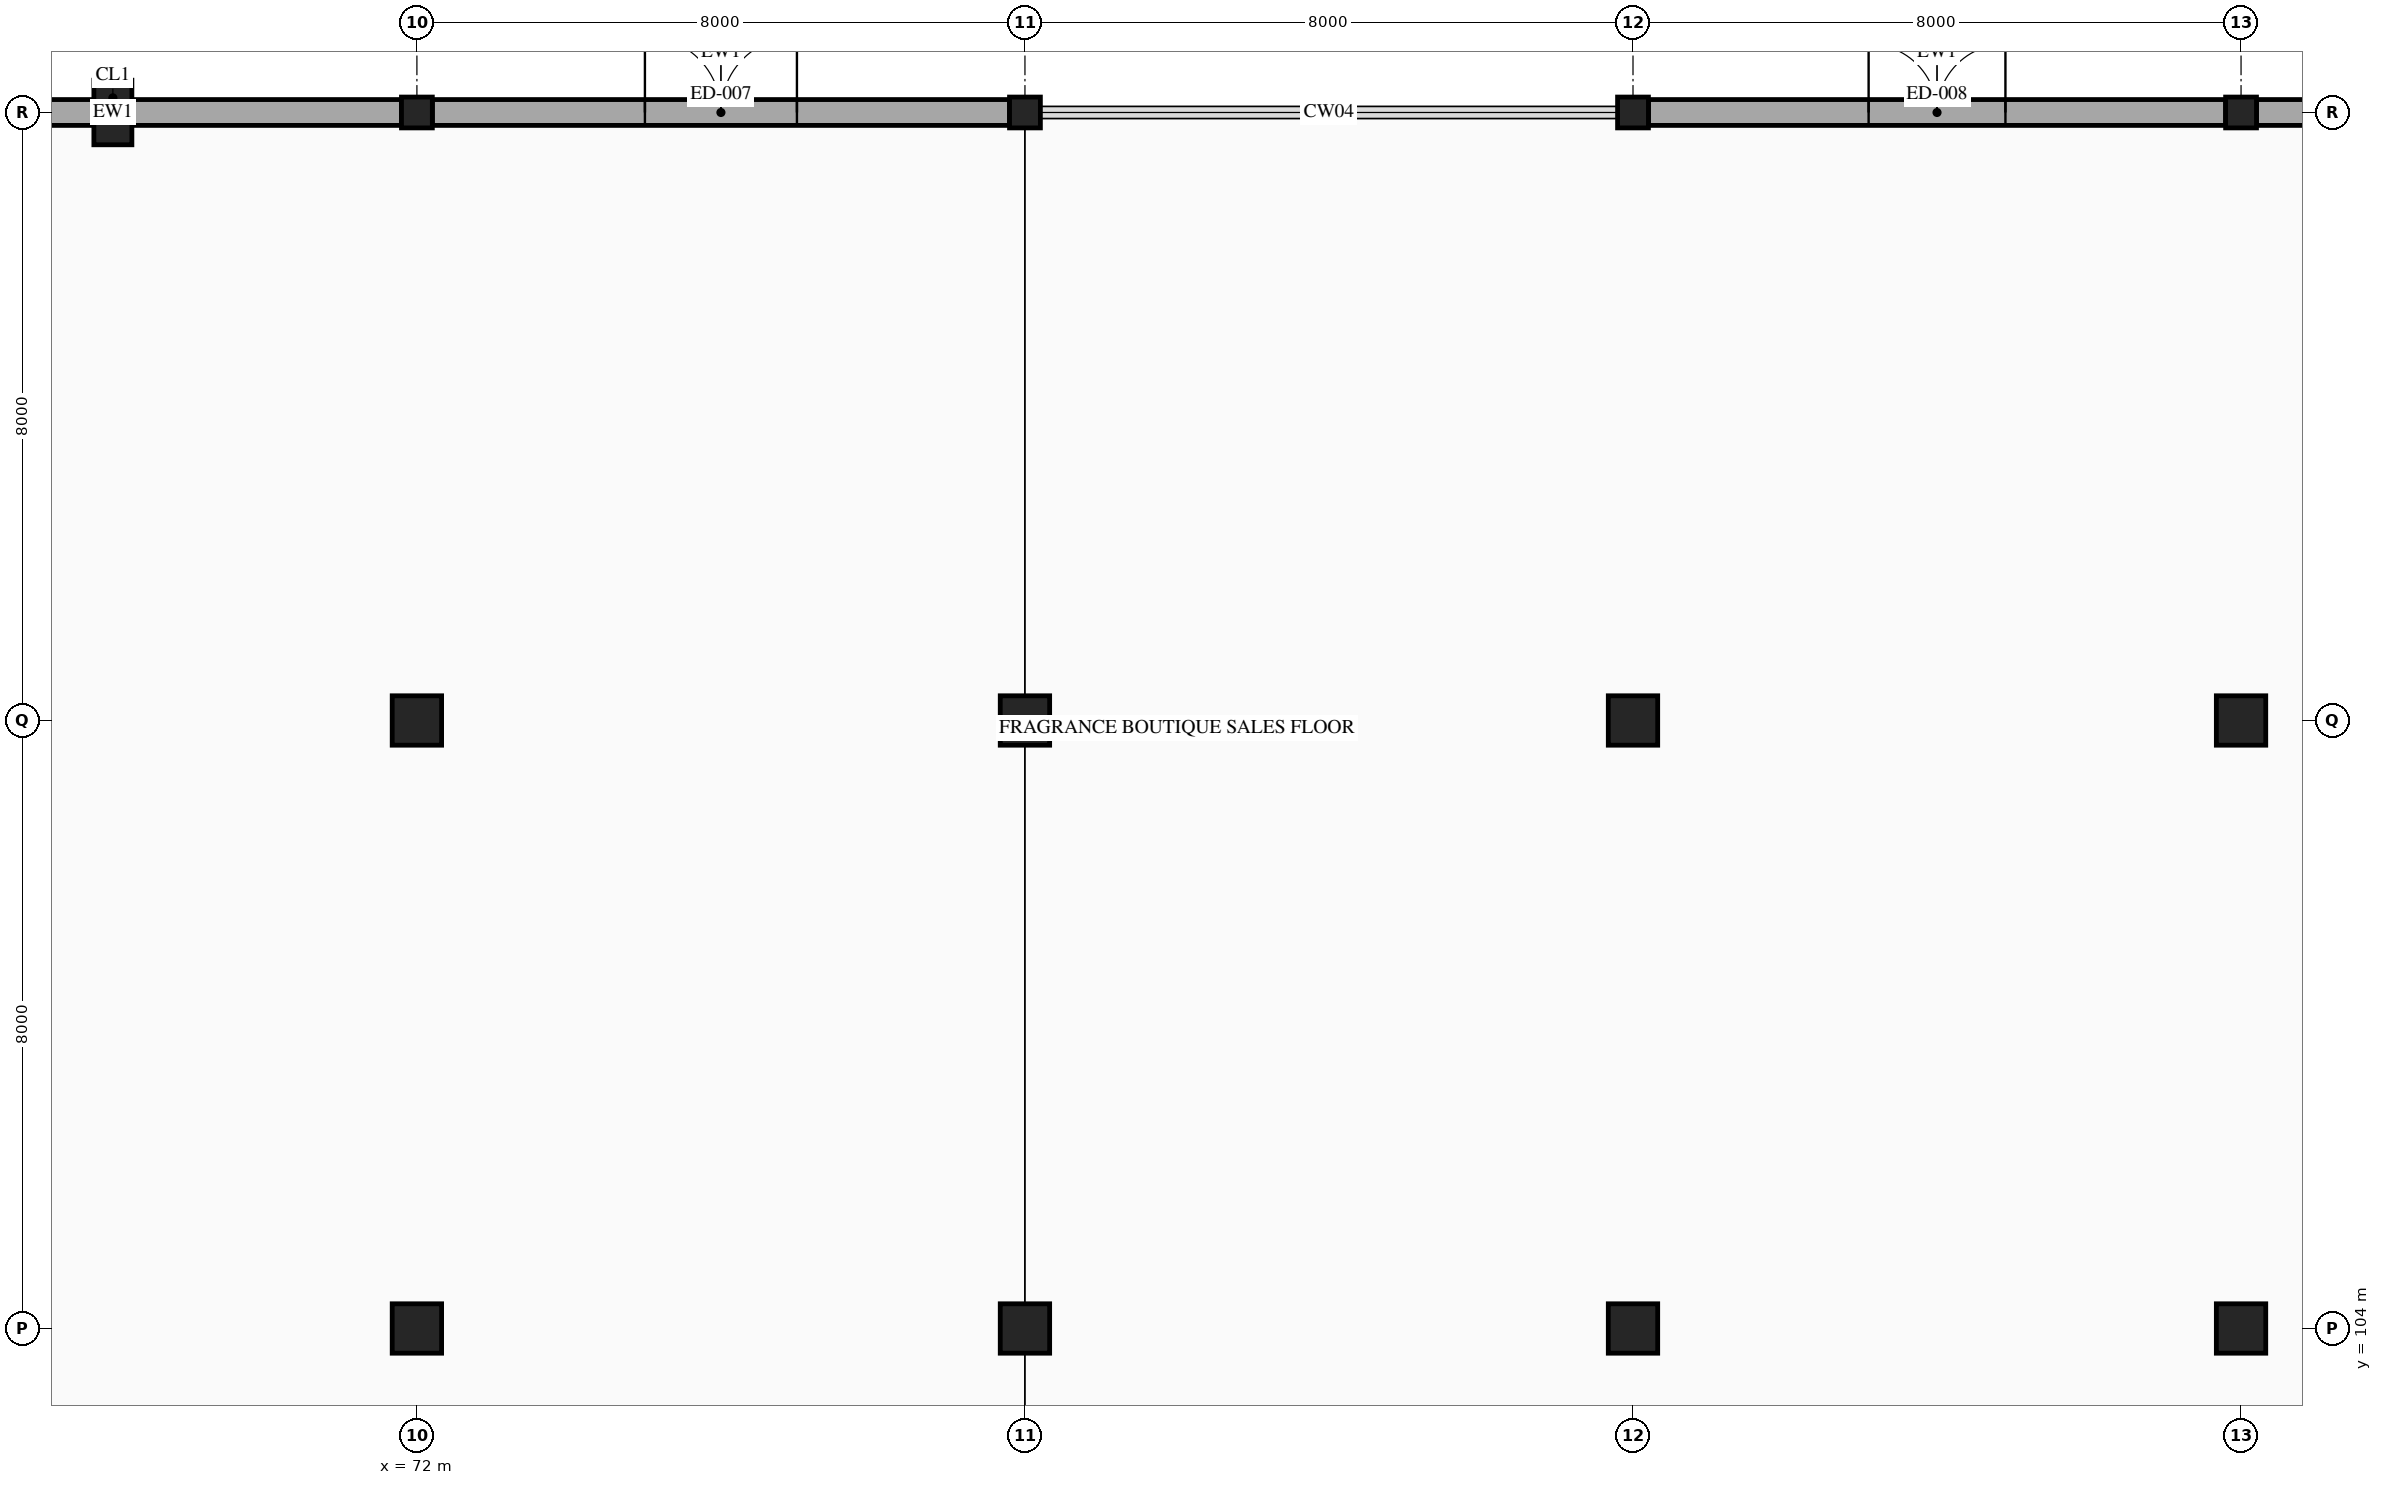
"""IFC4 building model, lengths in metres.
Left out: names, types, materials, properties, quantities, classifications, styles, units other than length and angle.
Written with IfcOpenShell. Run it as: python <this file> out.ifc"""

import sys

from ifc_helpers import new_model, si_unit, direction, frame, frame_2d, origin, origin_2d, place, context, subcontext, project, spatial, rectangle, hollow_rectangle, extrude, element, fill, save


model = new_model("IFC4")
c1 = context("Model", 3, precision=1e-05, world=origin(), true_north=direction((0.0, 1.0)))
c2 = subcontext(c1, "Body", "Model", "MODEL_VIEW")
j1 = project(units=[si_unit("LENGTHUNIT", "METRE"), si_unit("PLANEANGLEUNIT", "RADIAN")], contexts=[c1])
p1 = place(None, origin())
s1 = spatial("IfcSite", under=j1, at=p1, CompositionType="ELEMENT")
p2 = place(p1, origin())
s2 = spatial("IfcBuilding", under=s1, at=p2, CompositionType="ELEMENT")
p3 = place(p2, origin())
s3 = spatial("IfcBuildingStorey", under=s2, at=p3, CompositionType="ELEMENT", Elevation=0.0)
for number, where, z_axis, x_axis in (
    (1, (72.0, 104.0, 0.0), (0.0, 0.0, 1.0), (1.0, 0.0, 0.0)),
    (2, (72.0, 112.0, 0.0), (0.0, 0.0, 1.0), (1.0, 0.0, 0.0)),
):
    element("IfcColumn", number, at=place(p3, frame(where, z_axis=z_axis, x_axis=x_axis)), inside=s3, PredefinedType="COLUMN", context=c2, shape_type="SweptSolid", body=[
        extrude(rectangle(XDim=0.65, YDim=0.65, at=origin_2d()), origin(), (0.0, 0.0, 1.0), 5.6),
    ])
p4 = place(p3, frame((72.0, 120.0, 0.0), z_axis=(0.0, 0.0, 1.0), x_axis=(1.0, 0.0, 0.0)))
e3 = element("IfcColumn", 3, at=p4, inside=s3, PredefinedType="COLUMN", context=c2, shape_type="SweptSolid", body=[
    extrude(hollow_rectangle(XDim=0.406, YDim=0.406, WallThickness=0.015, InnerFilletRadius=0.015, OuterFilletRadius=0.029, at=origin_2d()), origin(), (0.0, 0.0, 1.0), 5.6),
])
for number, where, z_axis, x_axis in (
    (4, (80.0, 104.0, 0.0), (0.0, 0.0, 1.0), (1.0, 0.0, 0.0)),
    (5, (80.0, 112.0, 0.0), (0.0, 0.0, 1.0), (1.0, 0.0, 0.0)),
):
    element("IfcColumn", number, at=place(p3, frame(where, z_axis=z_axis, x_axis=x_axis)), inside=s3, PredefinedType="COLUMN", context=c2, shape_type="SweptSolid", body=[
        extrude(rectangle(XDim=0.65, YDim=0.65, at=origin_2d()), origin(), (0.0, 0.0, 1.0), 5.6),
    ])
p5 = place(p3, frame((80.0, 120.0, 0.0), z_axis=(0.0, 0.0, 1.0), x_axis=(1.0, 0.0, 0.0)))
e6 = element("IfcColumn", 6, at=p5, inside=s3, PredefinedType="COLUMN", context=c2, shape_type="SweptSolid", body=[
    extrude(hollow_rectangle(XDim=0.406, YDim=0.406, WallThickness=0.015, InnerFilletRadius=0.015, OuterFilletRadius=0.029, at=origin_2d()), origin(), (0.0, 0.0, 1.0), 5.6),
])
for number, where, z_axis, x_axis in (
    (7, (88.0, 104.0, 0.0), (0.0, 0.0, 1.0), (1.0, 0.0, 0.0)),
    (8, (88.0, 112.0, 0.0), (0.0, 0.0, 1.0), (1.0, 0.0, 0.0)),
):
    element("IfcColumn", number, at=place(p3, frame(where, z_axis=z_axis, x_axis=x_axis)), inside=s3, PredefinedType="COLUMN", context=c2, shape_type="SweptSolid", body=[
        extrude(rectangle(XDim=0.65, YDim=0.65, at=origin_2d()), origin(), (0.0, 0.0, 1.0), 5.6),
    ])
p6 = place(p3, frame((88.0, 120.0, 0.0), z_axis=(0.0, 0.0, 1.0), x_axis=(1.0, 0.0, 0.0)))
e9 = element("IfcColumn", 9, at=p6, inside=s3, PredefinedType="COLUMN", context=c2, shape_type="SweptSolid", body=[
    extrude(hollow_rectangle(XDim=0.406, YDim=0.406, WallThickness=0.015, InnerFilletRadius=0.015, OuterFilletRadius=0.029, at=origin_2d()), origin(), (0.0, 0.0, 1.0), 5.6),
])
for number, where, z_axis, x_axis in (
    (10, (96.0, 104.0, 0.0), (0.0, 0.0, 1.0), (1.0, 0.0, 0.0)),
    (11, (96.0, 112.0, 0.0), (0.0, 0.0, 1.0), (1.0, 0.0, 0.0)),
):
    element("IfcColumn", number, at=place(p3, frame(where, z_axis=z_axis, x_axis=x_axis)), inside=s3, PredefinedType="COLUMN", context=c2, shape_type="SweptSolid", body=[
        extrude(rectangle(XDim=0.65, YDim=0.65, at=origin_2d()), origin(), (0.0, 0.0, 1.0), 5.6),
    ])
p7 = place(p3, frame((96.0, 120.0, 0.0), z_axis=(0.0, 0.0, 1.0), x_axis=(1.0, 0.0, 0.0)))
e12 = element("IfcColumn", 12, at=p7, inside=s3, PredefinedType="COLUMN", context=c2, shape_type="SweptSolid", body=[
    extrude(hollow_rectangle(XDim=0.406, YDim=0.406, WallThickness=0.015, InnerFilletRadius=0.015, OuterFilletRadius=0.029, at=origin_2d()), origin(), (0.0, 0.0, 1.0), 5.6),
])
p8 = place(p3, frame((68.0, 120.0, 0.0), z_axis=(0.0, 0.0, 1.0), x_axis=(1.0, 0.0, 0.0)))
e13 = element("IfcColumn", 13, at=p8, inside=s3, PredefinedType="PILASTER", context=c2, shape_type="SweptSolid", body=[
    extrude(rectangle(XDim=0.5, YDim=0.85, at=origin_2d()), origin(), (0.0, 0.0, 1.0), 5.6),
])
p9 = place(p3, frame((64.203, 120.0, 0.0), z_axis=(0.0, 0.0, 1.0), x_axis=(1.0, 0.0, 0.0)))
e14 = element("IfcWall", 14, at=p9, inside=s3, PredefinedType="STANDARD", context=c2, shape_type="SweptSolid", body=[
    extrude(rectangle(XDim=7.594, YDim=0.34, at=frame_2d((3.797, 0.0))), origin(), (0.0, 0.0, 1.0), 4.58),
])
p10 = place(p3, frame((72.203, 120.0, 0.0), z_axis=(0.0, 0.0, 1.0), x_axis=(1.0, 0.0, 0.0)))
e15 = element("IfcWall", 15, at=p10, inside=s3, PredefinedType="STANDARD", context=c2, shape_type="SweptSolid", body=[
    extrude(rectangle(XDim=7.594, YDim=0.34, at=frame_2d((3.797, 0.0))), origin(), (0.0, 0.0, 1.0), 4.58),
])
p11 = place(p10, frame((2.797, 0.0, 0.0)))
e16 = element("IfcOpeningElement", 16, at=p11, cuts=e15, PredefinedType="OPENING", context=c2, shape_type="SweptSolid", body=[
    extrude(rectangle(XDim=2.0, YDim=2.35, at=frame_2d((1.0, 1.175))), frame((0.0, 0.18, 0.0), z_axis=(0.0, -1.0, 0.0), x_axis=(1.0, 0.0, 0.0)), (0.0, 0.0, 1.0), 0.36),
])
p12 = place(p3, frame((88.203, 120.0, 0.0), z_axis=(0.0, 0.0, 1.0), x_axis=(1.0, 0.0, 0.0)))
e17 = element("IfcWall", 17, at=p12, inside=s3, PredefinedType="STANDARD", context=c2, shape_type="SweptSolid", body=[
    extrude(rectangle(XDim=7.594, YDim=0.34, at=frame_2d((3.797, 0.0))), origin(), (0.0, 0.0, 1.0), 4.58),
])
p13 = place(p12, frame((2.897, 0.0, 0.0)))
e18 = element("IfcOpeningElement", 18, at=p13, cuts=e17, PredefinedType="OPENING", context=c2, shape_type="SweptSolid", body=[
    extrude(rectangle(XDim=1.8, YDim=2.3, at=frame_2d((0.9, 1.15))), frame((0.0, 0.18, 0.0), z_axis=(0.0, -1.0, 0.0), x_axis=(1.0, 0.0, 0.0)), (0.0, 0.0, 1.0), 0.36),
])
p14 = place(p3, frame((96.203, 120.0, 0.0), z_axis=(0.0, 0.0, 1.0), x_axis=(1.0, 0.0, 0.0)))
e19 = element("IfcWall", 19, at=p14, inside=s3, PredefinedType="STANDARD", context=c2, shape_type="SweptSolid", body=[
    extrude(rectangle(XDim=7.594, YDim=0.34, at=frame_2d((3.797, 0.0))), origin(), (0.0, 0.0, 1.0), 4.58),
])
p15 = place(p11, origin())
e20 = element("IfcDoor", 20, at=p15, inside=s3, OperationType="DOUBLE_DOOR_SINGLE_SWING", PredefinedType="DOOR", context=c2, shape_type="SweptSolid", body=[
    extrude(rectangle(XDim=2.0, YDim=2.35, at=frame_2d((1.0, 1.175))), frame((0.0, 0.025, 0.0), z_axis=(0.0, -1.0, 0.0), x_axis=(1.0, 0.0, 0.0)), (0.0, 0.0, 1.0), 0.05),
])
fill(e16, e20)
p16 = place(p13, origin())
e21 = element("IfcDoor", 21, at=p16, inside=s3, OperationType="DOUBLE_DOOR_SINGLE_SWING", PredefinedType="DOOR", context=c2, shape_type="SweptSolid", body=[
    extrude(rectangle(XDim=1.8, YDim=2.3, at=frame_2d((0.9, 1.15))), frame((0.0, 0.025, 0.0), z_axis=(0.0, -1.0, 0.0), x_axis=(1.0, 0.0, 0.0)), (0.0, 0.0, 1.0), 0.05),
])
fill(e18, e21)
save(model, sys.argv[1])
